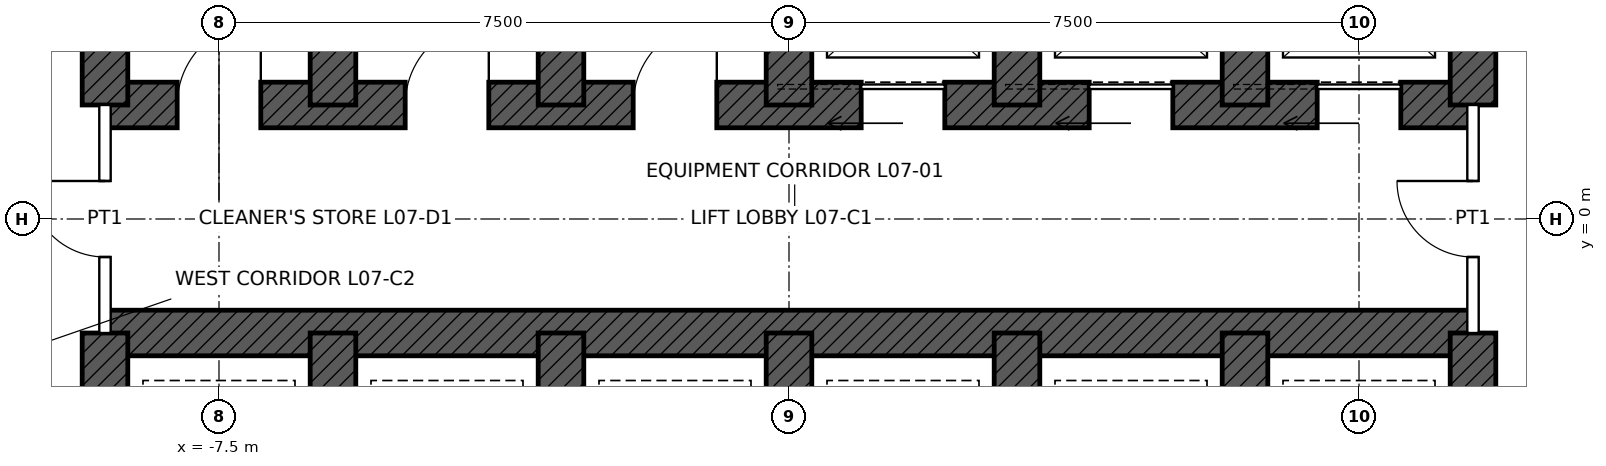
"""IFC4 building model, lengths in metres.
Left out: names, types, materials, properties, quantities, classifications, styles, units other than length and angle.
Written with IfcOpenShell. Run it as: python <this file> out.ifc"""

import sys

from ifc_helpers import new_model, si_unit, direction, frame, frame_2d, origin, place, context, subcontext, project, spatial, rectangle, extrude, element, fill, save


model = new_model("IFC4")
c1 = context("Model", 3, precision=1e-05, world=origin(), true_north=direction((0.0, 1.0)))
c2 = subcontext(c1, "Body", "Model", "MODEL_VIEW")
j1 = project(units=[si_unit("LENGTHUNIT", "METRE"), si_unit("PLANEANGLEUNIT", "RADIAN")], contexts=[c1])
p1 = place(None, origin())
s1 = spatial("IfcSite", under=j1, at=p1, CompositionType="ELEMENT")
p2 = place(p1, origin())
s2 = spatial("IfcBuilding", under=s1, at=p2, CompositionType="ELEMENT")
p3 = place(p2, frame((0.0, 0.0, 38.4)))
s3 = spatial("IfcBuildingStorey", under=s2, at=p3, CompositionType="ELEMENT", Elevation=38.4)
p4 = place(p3, frame((-9.0, 1.5, 0.0), z_axis=(0.0, 0.0, 1.0), x_axis=(1.0, 0.0, 0.0)))
e1 = element("IfcWall", 1, at=p4, inside=s3, PredefinedType="SHEAR", context=c2, shape_type="SweptSolid", body=[
    extrude(rectangle(XDim=18.0, YDim=0.6, at=frame_2d((9.0, 0.0))), origin(), (0.0, 0.0, 1.0), 5.0),
])
p5 = place(p4, frame((9.95, 0.0, 0.0)))
e2 = element("IfcOpeningElement", 2, at=p5, cuts=e1, PredefinedType="OPENING", context=c2, shape_type="SweptSolid", body=[
    extrude(rectangle(XDim=1.1, YDim=2.1, at=frame_2d((0.55, 1.05))), frame((0.0, 0.31, 0.0), z_axis=(0.0, -1.0, 0.0), x_axis=(1.0, 0.0, 0.0)), (0.0, 0.0, 1.0), 0.62),
])
p6 = place(p4, frame((12.95, 0.0, 0.0)))
e3 = element("IfcOpeningElement", 3, at=p6, cuts=e1, PredefinedType="OPENING", context=c2, shape_type="SweptSolid", body=[
    extrude(rectangle(XDim=1.1, YDim=2.1, at=frame_2d((0.55, 1.05))), frame((0.0, 0.31, 0.0), z_axis=(0.0, -1.0, 0.0), x_axis=(1.0, 0.0, 0.0)), (0.0, 0.0, 1.0), 0.62),
])
p7 = place(p4, frame((15.95, 0.0, 0.0)))
e4 = element("IfcOpeningElement", 4, at=p7, cuts=e1, PredefinedType="OPENING", context=c2, shape_type="SweptSolid", body=[
    extrude(rectangle(XDim=1.1, YDim=2.1, at=frame_2d((0.55, 1.05))), frame((0.0, 0.31, 0.0), z_axis=(0.0, -1.0, 0.0), x_axis=(1.0, 0.0, 0.0)), (0.0, 0.0, 1.0), 0.62),
])
p8 = place(p4, frame((0.95, 0.0, 0.0)))
e5 = element("IfcOpeningElement", 5, at=p8, cuts=e1, PredefinedType="OPENING", context=c2, shape_type="SweptSolid", body=[
    extrude(rectangle(XDim=1.1, YDim=2.1, at=frame_2d((0.55, 1.05))), frame((0.0, 0.31, 0.0), z_axis=(0.0, -1.0, 0.0), x_axis=(1.0, 0.0, 0.0)), (0.0, 0.0, 1.0), 0.62),
])
p9 = place(p4, frame((3.95, 0.0, 0.0)))
e6 = element("IfcOpeningElement", 6, at=p9, cuts=e1, PredefinedType="OPENING", context=c2, shape_type="SweptSolid", body=[
    extrude(rectangle(XDim=1.1, YDim=2.1, at=frame_2d((0.55, 1.05))), frame((0.0, 0.31, 0.0), z_axis=(0.0, -1.0, 0.0), x_axis=(1.0, 0.0, 0.0)), (0.0, 0.0, 1.0), 0.62),
])
p10 = place(p4, frame((6.95, 0.0, 0.0)))
e7 = element("IfcOpeningElement", 7, at=p10, cuts=e1, PredefinedType="OPENING", context=c2, shape_type="SweptSolid", body=[
    extrude(rectangle(XDim=1.1, YDim=2.1, at=frame_2d((0.55, 1.05))), frame((0.0, 0.31, 0.0), z_axis=(0.0, -1.0, 0.0), x_axis=(1.0, 0.0, 0.0)), (0.0, 0.0, 1.0), 0.62),
])
p11 = place(p3, frame((-9.0, -1.5, 0.0), z_axis=(0.0, 0.0, 1.0), x_axis=(1.0, 0.0, 0.0)))
e8 = element("IfcWall", 8, at=p11, inside=s3, PredefinedType="SHEAR", context=c2, shape_type="SweptSolid", body=[
    extrude(rectangle(XDim=18.0, YDim=0.6, at=frame_2d((9.0, 0.0))), origin(), (0.0, 0.0, 1.0), 5.0),
])
for number, where, z_axis, x_axis in (
    (9, (-9.0, 1.5, 0.0), (0.0, 0.0, 1.0), (0.0, 1.0, 0.0)),
    (10, (9.0, 1.5, 0.0), (0.0, 0.0, 1.0), (0.0, 1.0, 0.0)),
    (11, (-9.0, -4.5, 0.0), (0.0, 0.0, 1.0), (0.0, 1.0, 0.0)),
    (12, (9.0, -4.5, 0.0), (0.0, 0.0, 1.0), (0.0, 1.0, 0.0)),
    (13, (-6.0, 1.5, 0.0), (0.0, 0.0, 1.0), (0.0, 1.0, 0.0)),
    (14, (-3.0, 1.5, 0.0), (0.0, 0.0, 1.0), (0.0, 1.0, 0.0)),
    (15, (0.0, 1.5, 0.0), (0.0, 0.0, 1.0), (0.0, 1.0, 0.0)),
    (16, (3.0, 1.5, 0.0), (0.0, 0.0, 1.0), (0.0, 1.0, 0.0)),
    (17, (6.0, 1.5, 0.0), (0.0, 0.0, 1.0), (0.0, 1.0, 0.0)),
    (18, (-6.0, -4.5, 0.0), (0.0, 0.0, 1.0), (0.0, 1.0, 0.0)),
    (19, (-3.0, -4.5, 0.0), (0.0, 0.0, 1.0), (0.0, 1.0, 0.0)),
    (20, (0.0, -4.5, 0.0), (0.0, 0.0, 1.0), (0.0, 1.0, 0.0)),
    (21, (3.0, -4.5, 0.0), (0.0, 0.0, 1.0), (0.0, 1.0, 0.0)),
    (22, (6.0, -4.5, 0.0), (0.0, 0.0, 1.0), (0.0, 1.0, 0.0)),
):
    element("IfcWall", number, at=place(p3, frame(where, z_axis=z_axis, x_axis=x_axis)), inside=s3, PredefinedType="SHEAR", context=c2, shape_type="SweptSolid", body=[
        extrude(rectangle(XDim=3.0, YDim=0.6, at=frame_2d((1.5, 0.0))), origin(), (0.0, 0.0, 1.0), 5.0),
    ])
p12 = place(p3, frame((-9.0, -1.5, 0.0), z_axis=(0.0, 0.0, 1.0), x_axis=(0.0, 1.0, 0.0)))
e23 = element("IfcWall", 23, at=p12, inside=s3, PredefinedType="PARTITIONING", context=c2, shape_type="SweptSolid", body=[
    extrude(rectangle(XDim=3.0, YDim=0.15, at=frame_2d((1.5, 0.0))), origin(), (0.0, 0.0, 1.0), 4.75),
])
p13 = place(p12, frame((1.0, 0.0, 0.0)))
e24 = element("IfcOpeningElement", 24, at=p13, cuts=e23, PredefinedType="OPENING", context=c2, shape_type="SweptSolid", body=[
    extrude(rectangle(XDim=1.0, YDim=2.4, at=frame_2d((0.5, 1.2))), frame((0.0, 0.085, 0.0), z_axis=(0.0, -1.0, 0.0), x_axis=(1.0, 0.0, 0.0)), (0.0, 0.0, 1.0), 0.17),
])
p14 = place(p3, frame((9.0, -1.5, 0.0), z_axis=(0.0, 0.0, 1.0), x_axis=(0.0, 1.0, 0.0)))
e25 = element("IfcWall", 25, at=p14, inside=s3, PredefinedType="PARTITIONING", context=c2, shape_type="SweptSolid", body=[
    extrude(rectangle(XDim=3.0, YDim=0.15, at=frame_2d((1.5, 0.0))), origin(), (0.0, 0.0, 1.0), 4.75),
])
p15 = place(p14, frame((1.0, 0.0, 0.0)))
e26 = element("IfcOpeningElement", 26, at=p15, cuts=e25, PredefinedType="OPENING", context=c2, shape_type="SweptSolid", body=[
    extrude(rectangle(XDim=1.0, YDim=2.4, at=frame_2d((0.5, 1.2))), frame((0.0, 0.085, 0.0), z_axis=(0.0, -1.0, 0.0), x_axis=(1.0, 0.0, 0.0)), (0.0, 0.0, 1.0), 0.17),
])
p16 = place(p5, origin())
e27 = element("IfcDoor", 27, at=p16, inside=s3, OperationType="SLIDING_TO_LEFT", PredefinedType="DOOR", context=c2, shape_type="SweptSolid", body=[
    extrude(rectangle(XDim=1.1, YDim=2.1, at=frame_2d((0.55, 1.05))), frame((0.0, 0.025, 0.0), z_axis=(0.0, -1.0, 0.0), x_axis=(1.0, 0.0, 0.0)), (0.0, 0.0, 1.0), 0.05),
])
fill(e2, e27)
p17 = place(p6, origin())
e28 = element("IfcDoor", 28, at=p17, inside=s3, OperationType="SLIDING_TO_LEFT", PredefinedType="DOOR", context=c2, shape_type="SweptSolid", body=[
    extrude(rectangle(XDim=1.1, YDim=2.1, at=frame_2d((0.55, 1.05))), frame((0.0, 0.025, 0.0), z_axis=(0.0, -1.0, 0.0), x_axis=(1.0, 0.0, 0.0)), (0.0, 0.0, 1.0), 0.05),
])
fill(e3, e28)
p18 = place(p7, origin())
e29 = element("IfcDoor", 29, at=p18, inside=s3, OperationType="SLIDING_TO_LEFT", PredefinedType="DOOR", context=c2, shape_type="SweptSolid", body=[
    extrude(rectangle(XDim=1.1, YDim=2.1, at=frame_2d((0.55, 1.05))), frame((0.0, 0.025, 0.0), z_axis=(0.0, -1.0, 0.0), x_axis=(1.0, 0.0, 0.0)), (0.0, 0.0, 1.0), 0.05),
])
fill(e4, e29)
p19 = place(p13, origin())
e30 = element("IfcDoor", 30, at=p19, inside=s3, OperationType="SINGLE_SWING_RIGHT", PredefinedType="DOOR", context=c2, shape_type="SweptSolid", body=[
    extrude(rectangle(XDim=1.0, YDim=2.4, at=frame_2d((0.5, 1.2))), frame((0.0, 0.025, 0.0), z_axis=(0.0, -1.0, 0.0), x_axis=(1.0, 0.0, 0.0)), (0.0, 0.0, 1.0), 0.05),
])
fill(e24, e30)
p20 = place(p15, origin())
e31 = element("IfcDoor", 31, at=p20, inside=s3, OperationType="SINGLE_SWING_RIGHT", PredefinedType="DOOR", context=c2, shape_type="SweptSolid", body=[
    extrude(rectangle(XDim=1.0, YDim=2.4, at=frame_2d((0.5, 1.2))), frame((0.0, 0.025, 0.0), z_axis=(0.0, -1.0, 0.0), x_axis=(1.0, 0.0, 0.0)), (0.0, 0.0, 1.0), 0.05),
])
fill(e26, e31)
p21 = place(p8, origin())
e32 = element("IfcDoor", 32, at=p21, inside=s3, OperationType="SINGLE_SWING_RIGHT", PredefinedType="DOOR", context=c2, shape_type="SweptSolid", body=[
    extrude(rectangle(XDim=1.1, YDim=2.1, at=frame_2d((0.55, 1.05))), frame((0.0, 0.025, 0.0), z_axis=(0.0, -1.0, 0.0), x_axis=(1.0, 0.0, 0.0)), (0.0, 0.0, 1.0), 0.05),
])
fill(e5, e32)
p22 = place(p9, origin())
e33 = element("IfcDoor", 33, at=p22, inside=s3, OperationType="SINGLE_SWING_RIGHT", PredefinedType="DOOR", context=c2, shape_type="SweptSolid", body=[
    extrude(rectangle(XDim=1.1, YDim=2.1, at=frame_2d((0.55, 1.05))), frame((0.0, 0.025, 0.0), z_axis=(0.0, -1.0, 0.0), x_axis=(1.0, 0.0, 0.0)), (0.0, 0.0, 1.0), 0.05),
])
fill(e6, e33)
p23 = place(p10, origin())
e34 = element("IfcDoor", 34, at=p23, inside=s3, OperationType="SINGLE_SWING_RIGHT", PredefinedType="DOOR", context=c2, shape_type="SweptSolid", body=[
    extrude(rectangle(XDim=1.1, YDim=2.1, at=frame_2d((0.55, 1.05))), frame((0.0, 0.025, 0.0), z_axis=(0.0, -1.0, 0.0), x_axis=(1.0, 0.0, 0.0)), (0.0, 0.0, 1.0), 0.05),
])
fill(e7, e34)
save(model, sys.argv[1])
